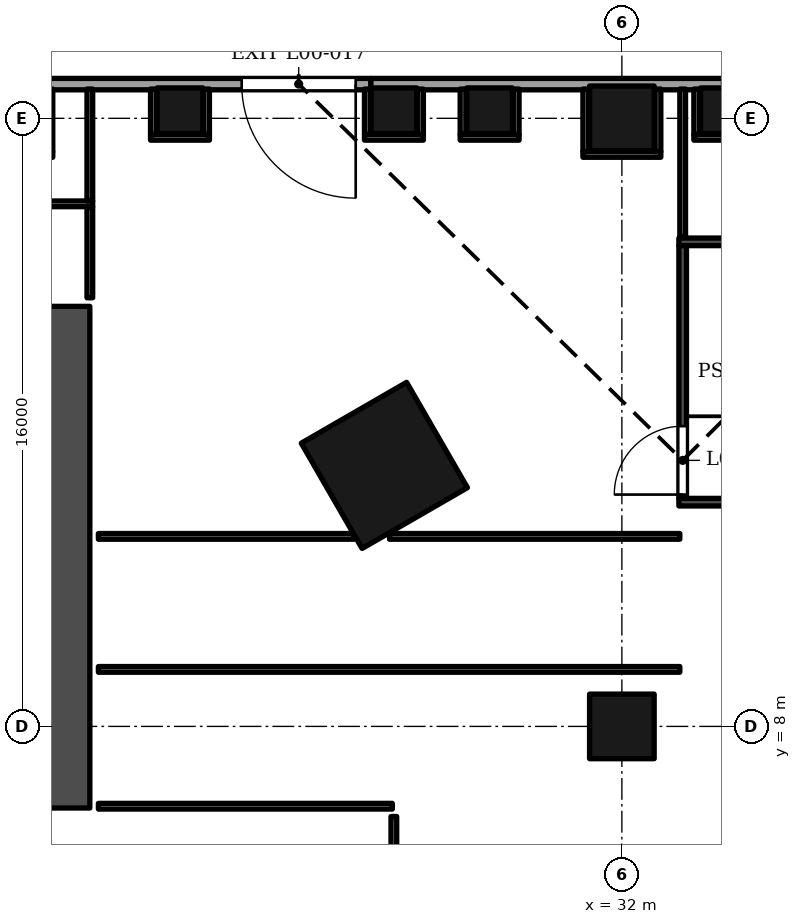
"""IFC4 building model, lengths in metres.
Left out: names, types, materials, properties, quantities, classifications, styles, units other than length and angle.
Written with IfcOpenShell. Run it as: python <this file> out.ifc"""

import sys

from ifc_helpers import new_model, si_unit, direction, frame, frame_2d, origin, origin_2d, place, context, subcontext, project, spatial, rectangle, extrude, element, fill, save


model = new_model("IFC4")
c1 = context("Model", 3, precision=1e-05, world=origin(), true_north=direction((0.0, 1.0)))
c2 = subcontext(c1, "Body", "Model", "MODEL_VIEW")
j1 = project(units=[si_unit("LENGTHUNIT", "METRE"), si_unit("PLANEANGLEUNIT", "RADIAN")], contexts=[c1])
p1 = place(None, origin())
s1 = spatial("IfcSite", under=j1, at=p1, CompositionType="ELEMENT")
p2 = place(p1, origin())
s2 = spatial("IfcBuilding", under=s1, at=p2, CompositionType="ELEMENT")
p3 = place(p2, origin())
s3 = spatial("IfcBuildingStorey", under=s2, at=p3, CompositionType="ELEMENT", Elevation=0.0)
for number, where, z_axis, x_axis in (
    (1, (32.0, 8.0, 0.0), (0.0, 0.0, 1.0), (1.0, 0.0, 0.0)),
    (2, (32.0, 24.0, 0.0), (0.0, 0.0, 1.0), (1.0, 0.0, 0.0)),
):
    element("IfcColumn", number, at=place(p3, frame(where, z_axis=z_axis, x_axis=x_axis)), inside=s3, PredefinedType="COLUMN", context=c2, shape_type="SweptSolid", body=[
        extrude(rectangle(XDim=1.7, YDim=1.7, at=origin_2d()), origin(), (0.0, 0.0, 1.0), 9.0),
    ])
for number, where, z_axis, x_axis in (
    (3, (34.669, 24.2, 0.0), (0.0, 0.0, 1.0), (1.0, 0.0, 0.0)),
    (4, (26.002, 24.2, 0.0), (0.0, 0.0, 1.0), (1.0, 0.0, 0.0)),
    (5, (20.372, 24.2, 0.0), (0.0, 0.0, 1.0), (1.0, 0.0, 0.0)),
    (6, (28.52, 24.2, 0.0), (0.0, 0.0, 1.0), (1.0, 0.0, 0.0)),
):
    element("IfcColumn", number, at=place(p3, frame(where, z_axis=z_axis, x_axis=x_axis)), inside=s3, PredefinedType="COLUMN", context=c2, shape_type="SweptSolid", body=[
        extrude(rectangle(XDim=1.2, YDim=1.2, at=origin_2d()), origin(), (0.0, 0.0, 1.0), 9.0),
    ])
p4 = place(p3, frame((25.75, 14.867, 0.0), z_axis=(0.0, 0.0, 1.0), x_axis=(-0.866025386331, -0.50000003023, 0.0)))
e7 = element("IfcColumn", 7, at=p4, inside=s3, PredefinedType="COLUMN", context=c2, shape_type="SweptSolid", body=[
    extrude(rectangle(XDim=3.2, YDim=3.2, at=origin_2d()), origin(), (0.0, 0.0, 1.0), 9.0),
])
p5 = place(p3, frame((17.45, 5.853, 0.0), z_axis=(0.0, 0.0, 1.0), x_axis=(0.0, 1.0, 0.0)))
e8 = element("IfcWall", 8, at=p5, inside=s3, PredefinedType="SHEAR", context=c2, shape_type="SweptSolid", body=[
    extrude(rectangle(XDim=13.2, YDim=1.1, at=frame_2d((6.6, 0.0))), origin(), (0.0, 0.0, 1.0), 9.0),
])
p6 = place(p5, frame((4.1, 0.0, 0.0)))
e9 = element("IfcOpeningElement", 9, at=p6, cuts=e8, PredefinedType="OPENING", context=c2, shape_type="SweptSolid", body=[
    extrude(rectangle(XDim=1.6, YDim=2.1, at=frame_2d((0.8, 1.05))), frame((0.0, 0.56, 0.0), z_axis=(0.0, -1.0, 0.0), x_axis=(1.0, 0.0, 0.0)), (0.0, 0.0, 1.0), 1.12),
])
p7 = place(p5, frame((10.15, 0.0, 0.0)))
e10 = element("IfcOpeningElement", 10, at=p7, cuts=e8, PredefinedType="OPENING", context=c2, shape_type="SweptSolid", body=[
    extrude(rectangle(XDim=0.9, YDim=2.1, at=frame_2d((0.45, 1.05))), frame((0.0, 0.56, 0.0), z_axis=(0.0, -1.0, 0.0), x_axis=(1.0, 0.0, 0.0)), (0.0, 0.0, 1.0), 1.12),
])
p8 = place(p3, frame((25.396, 24.9, 0.0), z_axis=(0.0, 0.0, 1.0), x_axis=(-1.0, 0.0, 0.0)))
e11 = element("IfcWall", 11, at=p8, inside=s3, PredefinedType="ELEMENTEDWALL", context=c2, shape_type="SweptSolid", body=[
    extrude(rectangle(XDim=25.15, YDim=0.3, at=frame_2d((12.575, 0.0))), origin(), (0.0, 0.0, 1.0), 7.6),
])
p9 = place(p8, frame((0.4, 0.0, 0.0)))
e12 = element("IfcOpeningElement", 12, at=p9, cuts=e11, PredefinedType="OPENING", context=c2, shape_type="SweptSolid", body=[
    extrude(rectangle(XDim=3.0, YDim=2.7, at=frame_2d((1.5, 1.35))), frame((0.0, 0.16, 0.0), z_axis=(0.0, -1.0, 0.0), x_axis=(1.0, 0.0, 0.0)), (0.0, 0.0, 1.0), 0.32),
])
p10 = place(p3, frame((34.673, 24.9, 0.0), z_axis=(0.0, 0.0, 1.0), x_axis=(-1.0, 0.0, 0.0)))
e13 = element("IfcWall", 13, at=p10, inside=s3, PredefinedType="SOLIDWALL", context=c2, shape_type="SweptSolid", body=[
    extrude(rectangle(XDim=9.277, YDim=0.3, at=frame_2d((4.639, 0.0))), origin(), (0.0, 0.0, 1.0), 7.6),
])
for number, where, z_axis, x_axis in (
    (14, (33.5, 13.9, 0.0), (0.0, 0.0, 1.0), (1.0, 0.0, 0.0)),
    (15, (33.5, 20.75, 0.0), (0.0, 0.0, 1.0), (1.0, 0.0, 0.0)),
):
    element("IfcWall", number, at=place(p3, frame(where, z_axis=z_axis, x_axis=x_axis)), inside=s3, PredefinedType="SOLIDWALL", context=c2, shape_type="SweptSolid", body=[
        extrude(rectangle(XDim=4.87, YDim=0.2, at=frame_2d((2.435, 0.0))), origin(), (0.0, 0.0, 1.0), 8.5),
    ])
p11 = place(p3, frame((33.6, 14.0, 0.0), z_axis=(0.0, 0.0, 1.0), x_axis=(0.0, 1.0, 0.0)))
e16 = element("IfcWall", 16, at=p11, inside=s3, PredefinedType="SOLIDWALL", context=c2, shape_type="SweptSolid", body=[
    extrude(rectangle(XDim=6.65, YDim=0.2, at=frame_2d((3.325, 0.0))), origin(), (0.0, 0.0, 1.0), 8.5),
])
p12 = place(p11, frame((0.1, 0.0, 0.0)))
e17 = element("IfcOpeningElement", 17, at=p12, cuts=e16, PredefinedType="OPENING", context=c2, shape_type="SweptSolid", body=[
    extrude(rectangle(XDim=1.8, YDim=2.4, at=frame_2d((0.9, 1.2))), frame((0.0, 0.11, 0.0), z_axis=(0.0, -1.0, 0.0), x_axis=(1.0, 0.0, 0.0)), (0.0, 0.0, 1.0), 0.22),
])
p13 = place(p3, frame((26.0, 0.075, 0.0), z_axis=(0.0, 0.0, 1.0), x_axis=(0.0, 1.0, 0.0)))
e18 = element("IfcWall", 18, at=p13, inside=s3, PredefinedType="PARTITIONING", context=c2, shape_type="SweptSolid", body=[
    extrude(rectangle(XDim=5.555, YDim=0.15, at=frame_2d((2.777, 0.0))), origin(), (0.0, 0.0, 1.0), 8.5),
])
p14 = place(p3, frame((18.225, 5.9, 0.0), z_axis=(0.0, 0.0, 1.0), x_axis=(1.0, 0.0, 0.0)))
e19 = element("IfcWall", 19, at=p14, inside=s3, PredefinedType="PARTITIONING", context=c2, shape_type="SweptSolid", body=[
    extrude(rectangle(XDim=7.735, YDim=0.15, at=frame_2d((3.867, 0.0))), origin(), (0.0, 0.0, 1.0), 7.6),
])
p15 = place(p3, frame((18.225, 9.5, 0.0), z_axis=(0.0, 0.0, 1.0), x_axis=(1.0, 0.0, 0.0)))
e20 = element("IfcWall", 20, at=p15, inside=s3, PredefinedType="PARTITIONING", context=c2, shape_type="SweptSolid", body=[
    extrude(rectangle(XDim=15.3, YDim=0.15, at=frame_2d((7.65, 0.0))), origin(), (0.0, 0.0, 1.0), 7.3),
])
p16 = place(p3, frame((18.225, 13.0, 0.0), z_axis=(0.0, 0.0, 1.0), x_axis=(1.0, 0.0, 0.0)))
e21 = element("IfcWall", 21, at=p16, inside=s3, PredefinedType="PARTITIONING", context=c2, shape_type="SweptSolid", body=[
    extrude(rectangle(XDim=6.732, YDim=0.15, at=frame_2d((3.366, 0.0))), origin(), (0.0, 0.0, 1.0), 7.6),
])
p17 = place(p16, frame((3.575, 0.0, 0.0)))
e22 = element("IfcOpeningElement", 22, at=p17, cuts=e21, PredefinedType="OPENING", context=c2, shape_type="SweptSolid", body=[
    extrude(rectangle(XDim=1.2, YDim=2.1, at=frame_2d((0.6, 1.05))), frame((0.0, 0.085, 0.0), z_axis=(0.0, -1.0, 0.0), x_axis=(1.0, 0.0, 0.0)), (0.0, 0.0, 1.0), 0.17),
])
p18 = place(p3, frame((25.886, 13.0, 0.0), z_axis=(0.0, 0.0, 1.0), x_axis=(1.0, 0.0, 0.0)))
e23 = element("IfcWall", 23, at=p18, inside=s3, PredefinedType="PARTITIONING", context=c2, shape_type="SweptSolid", body=[
    extrude(rectangle(XDim=7.639, YDim=0.15, at=frame_2d((3.819, 0.0))), origin(), (0.0, 0.0, 1.0), 7.3),
])
p19 = place(p3, frame((18.0, 19.278, 0.0), z_axis=(0.0, 0.0, 1.0), x_axis=(0.0, 1.0, 0.0)))
e24 = element("IfcWall", 24, at=p19, inside=s3, PredefinedType="PARTITIONING", context=c2, shape_type="SweptSolid", body=[
    extrude(rectangle(XDim=2.397, YDim=0.15, at=frame_2d((1.198, 0.0))), origin(), (0.0, 0.0, 1.0), 8.5),
])
p20 = place(p3, frame((33.6, 20.89, 0.0), z_axis=(0.0, 0.0, 1.0), x_axis=(0.0, 1.0, 0.0)))
e25 = element("IfcWall", 25, at=p20, inside=s3, PredefinedType="PARTITIONING", context=c2, shape_type="SweptSolid", body=[
    extrude(rectangle(XDim=3.88, YDim=0.15, at=frame_2d((1.94, 0.0))), origin(), (0.0, 0.0, 1.0), 7.6),
])
p21 = place(p20, frame((0.61, 0.0, 0.0)))
e26 = element("IfcOpeningElement", 26, at=p21, cuts=e25, PredefinedType="OPENING", context=c2, shape_type="SweptSolid", body=[
    extrude(rectangle(XDim=1.2, YDim=2.1, at=frame_2d((0.6, 1.05))), frame((0.0, 0.085, 0.0), z_axis=(0.0, -1.0, 0.0), x_axis=(1.0, 0.0, 0.0)), (0.0, 0.0, 1.0), 0.17),
])
p22 = place(p3, frame((-18.075, 21.75, 0.0), z_axis=(0.0, 0.0, 1.0), x_axis=(1.0, 0.0, 0.0)))
e27 = element("IfcWall", 27, at=p22, inside=s3, PredefinedType="PARTITIONING", context=c2, shape_type="SweptSolid", body=[
    extrude(rectangle(XDim=36.15, YDim=0.15, at=frame_2d((18.075, 0.0))), origin(), (0.0, 0.0, 1.0), 7.3),
])
p23 = place(p22, frame((2.675, 0.0, 0.0)))
e28 = element("IfcOpeningElement", 28, at=p23, cuts=e27, PredefinedType="OPENING", context=c2, shape_type="SweptSolid", body=[
    extrude(rectangle(XDim=0.9, YDim=2.1, at=frame_2d((0.45, 1.05))), frame((0.0, 0.085, 0.0), z_axis=(0.0, -1.0, 0.0), x_axis=(1.0, 0.0, 0.0)), (0.0, 0.0, 1.0), 0.17),
])
p24 = place(p22, frame((8.675, 0.0, 0.0)))
e29 = element("IfcOpeningElement", 29, at=p24, cuts=e27, PredefinedType="OPENING", context=c2, shape_type="SweptSolid", body=[
    extrude(rectangle(XDim=0.9, YDim=2.1, at=frame_2d((0.45, 1.05))), frame((0.0, 0.085, 0.0), z_axis=(0.0, -1.0, 0.0), x_axis=(1.0, 0.0, 0.0)), (0.0, 0.0, 1.0), 0.17),
])
p25 = place(p22, frame((14.675, 0.0, 0.0)))
e30 = element("IfcOpeningElement", 30, at=p25, cuts=e27, PredefinedType="OPENING", context=c2, shape_type="SweptSolid", body=[
    extrude(rectangle(XDim=0.9, YDim=2.1, at=frame_2d((0.45, 1.05))), frame((0.0, 0.085, 0.0), z_axis=(0.0, -1.0, 0.0), x_axis=(1.0, 0.0, 0.0)), (0.0, 0.0, 1.0), 0.17),
])
p26 = place(p22, frame((20.675, 0.0, 0.0)))
e31 = element("IfcOpeningElement", 31, at=p26, cuts=e27, PredefinedType="OPENING", context=c2, shape_type="SweptSolid", body=[
    extrude(rectangle(XDim=0.9, YDim=2.1, at=frame_2d((0.45, 1.05))), frame((0.0, 0.085, 0.0), z_axis=(0.0, -1.0, 0.0), x_axis=(1.0, 0.0, 0.0)), (0.0, 0.0, 1.0), 0.17),
])
p27 = place(p22, frame((26.675, 0.0, 0.0)))
e32 = element("IfcOpeningElement", 32, at=p27, cuts=e27, PredefinedType="OPENING", context=c2, shape_type="SweptSolid", body=[
    extrude(rectangle(XDim=0.9, YDim=2.1, at=frame_2d((0.45, 1.05))), frame((0.0, 0.085, 0.0), z_axis=(0.0, -1.0, 0.0), x_axis=(1.0, 0.0, 0.0)), (0.0, 0.0, 1.0), 0.17),
])
p28 = place(p22, frame((32.675, 0.0, 0.0)))
e33 = element("IfcOpeningElement", 33, at=p28, cuts=e27, PredefinedType="OPENING", context=c2, shape_type="SweptSolid", body=[
    extrude(rectangle(XDim=0.9, YDim=2.1, at=frame_2d((0.45, 1.05))), frame((0.0, 0.085, 0.0), z_axis=(0.0, -1.0, 0.0), x_axis=(1.0, 0.0, 0.0)), (0.0, 0.0, 1.0), 0.17),
])
p29 = place(p3, frame((18.0, 21.825, 0.0), z_axis=(0.0, 0.0, 1.0), x_axis=(0.0, 1.0, 0.0)))
e34 = element("IfcWall", 34, at=p29, inside=s3, PredefinedType="PARTITIONING", context=c2, shape_type="SweptSolid", body=[
    extrude(rectangle(XDim=2.945, YDim=0.15, at=frame_2d((1.473, 0.0))), origin(), (0.0, 0.0, 1.0), 7.3),
])
for number, where, z_axis, x_axis in (
    (35, (14.975, 23.05, 0.0), (0.0, 0.0, 1.0), (1.0, 0.0, 0.0)),
    (36, (30.975, 23.05, 0.0), (0.0, 0.0, 1.0), (1.0, 0.0, 0.0)),
):
    element("IfcWall", number, at=place(p3, frame(where, z_axis=z_axis, x_axis=x_axis)), inside=s3, PredefinedType="PARTITIONING", context=c2, shape_type="SweptSolid", body=[
        extrude(rectangle(XDim=2.05, YDim=0.15, at=frame_2d((1.025, 0.0))), origin(), (0.0, 0.0, 1.0), 7.3),
    ])
for number, where, z_axis, x_axis in (
    (37, (16.95, 23.125, 0.0), (0.0, 0.0, 1.0), (0.0, 1.0, 0.0)),
    (38, (31.05, 23.125, 0.0), (0.0, 0.0, 1.0), (0.0, 1.0, 0.0)),
):
    element("IfcWall", number, at=place(p3, frame(where, z_axis=z_axis, x_axis=x_axis)), inside=s3, PredefinedType="PARTITIONING", context=c2, shape_type="SweptSolid", body=[
        extrude(rectangle(XDim=1.645, YDim=0.15, at=frame_2d((0.823, 0.0))), origin(), (0.0, 0.0, 1.0), 7.3),
    ])
p30 = place(p3, frame((32.95, 23.125, 0.0), z_axis=(0.0, 0.0, 1.0), x_axis=(0.0, 1.0, 0.0)))
e39 = element("IfcWall", 39, at=p30, inside=s3, PredefinedType="PARTITIONING", context=c2, shape_type="SweptSolid", body=[
    extrude(rectangle(XDim=1.645, YDim=0.15, at=frame_2d((0.823, 0.0))), origin(), (0.0, 0.0, 1.0), 7.6),
])
for number, where, z_axis, x_axis in (
    (40, (19.597, 23.5, 0.0), (0.0, 0.0, 1.0), (1.0, 0.0, 0.0)),
    (41, (25.227, 23.5, 0.0), (0.0, 0.0, 1.0), (1.0, 0.0, 0.0)),
):
    element("IfcWall", number, at=place(p3, frame(where, z_axis=z_axis, x_axis=x_axis)), inside=s3, PredefinedType="PARTITIONING", context=c2, shape_type="SweptSolid", body=[
        extrude(rectangle(XDim=1.55, YDim=0.15, at=frame_2d((0.775, 0.0))), origin(), (0.0, 0.0, 1.0), 8.5),
    ])
p31 = place(p3, frame((27.745, 23.5, 0.0), z_axis=(0.0, 0.0, 1.0), x_axis=(1.0, 0.0, 0.0)))
e42 = element("IfcWall", 42, at=p31, inside=s3, PredefinedType="PARTITIONING", context=c2, shape_type="SweptSolid", body=[
    extrude(rectangle(XDim=1.55, YDim=0.15, at=frame_2d((0.775, 0.0))), origin(), (0.0, 0.0, 1.0), 8.5),
])
p32 = place(p3, frame((33.894, 23.5, 0.0), z_axis=(0.0, 0.0, 1.0), x_axis=(1.0, 0.0, 0.0)))
e43 = element("IfcWall", 43, at=p32, inside=s3, PredefinedType="PARTITIONING", context=c2, shape_type="SweptSolid", body=[
    extrude(rectangle(XDim=1.55, YDim=0.15, at=frame_2d((0.775, 0.0))), origin(), (0.0, 0.0, 1.0), 8.5),
])
for number, where, z_axis, x_axis in (
    (44, (19.672, 23.575, 0.0), (0.0, 0.0, 1.0), (0.0, 1.0, 0.0)),
    (45, (21.072, 23.575, 0.0), (0.0, 0.0, 1.0), (0.0, 1.0, 0.0)),
    (46, (25.302, 23.575, 0.0), (0.0, 0.0, 1.0), (0.0, 1.0, 0.0)),
):
    element("IfcWall", number, at=place(p3, frame(where, z_axis=z_axis, x_axis=x_axis)), inside=s3, PredefinedType="PARTITIONING", context=c2, shape_type="SweptSolid", body=[
        extrude(rectangle(XDim=1.195, YDim=0.15, at=frame_2d((0.598, 0.0))), origin(), (0.0, 0.0, 1.0), 7.3),
    ])
for number, where, z_axis, x_axis in (
    (47, (26.702, 23.575, 0.0), (0.0, 0.0, 1.0), (0.0, 1.0, 0.0)),
    (48, (27.82, 23.575, 0.0), (0.0, 0.0, 1.0), (0.0, 1.0, 0.0)),
):
    element("IfcWall", number, at=place(p3, frame(where, z_axis=z_axis, x_axis=x_axis)), inside=s3, PredefinedType="PARTITIONING", context=c2, shape_type="SweptSolid", body=[
        extrude(rectangle(XDim=1.195, YDim=0.15, at=frame_2d((0.598, 0.0))), origin(), (0.0, 0.0, 1.0), 7.6),
    ])
p33 = place(p3, frame((29.22, 23.575, 0.0), z_axis=(0.0, 0.0, 1.0), x_axis=(0.0, 1.0, 0.0)))
e49 = element("IfcWall", 49, at=p33, inside=s3, PredefinedType="PARTITIONING", context=c2, shape_type="SweptSolid", body=[
    extrude(rectangle(XDim=1.195, YDim=0.15, at=frame_2d((0.598, 0.0))), origin(), (0.0, 0.0, 1.0), 7.3),
])
p34 = place(p3, frame((33.969, 23.575, 0.0), z_axis=(0.0, 0.0, 1.0), x_axis=(0.0, 1.0, 0.0)))
e50 = element("IfcWall", 50, at=p34, inside=s3, PredefinedType="PARTITIONING", context=c2, shape_type="SweptSolid", body=[
    extrude(rectangle(XDim=1.195, YDim=0.15, at=frame_2d((0.598, 0.0))), origin(), (0.0, 0.0, 1.0), 7.6),
])
p35 = place(p9, origin())
e51 = element("IfcDoor", 51, at=p35, inside=s3, OperationType="DOUBLE_DOOR_SINGLE_SWING", PredefinedType="DOOR", context=c2, shape_type="SweptSolid", body=[
    extrude(rectangle(XDim=3.0, YDim=2.7, at=frame_2d((1.5, 1.35))), frame((0.0, 0.025, 0.0), z_axis=(0.0, -1.0, 0.0), x_axis=(1.0, 0.0, 0.0)), (0.0, 0.0, 1.0), 0.05),
])
fill(e12, e51)
p36 = place(p6, origin())
e52 = element("IfcDoor", 52, at=p36, inside=s3, OperationType="DOUBLE_DOOR_SINGLE_SWING", PredefinedType="DOOR", context=c2, shape_type="SweptSolid", body=[
    extrude(rectangle(XDim=1.6, YDim=2.1, at=frame_2d((0.8, 1.05))), frame((0.0, 0.275, 0.0), z_axis=(0.0, -1.0, 0.0), x_axis=(1.0, 0.0, 0.0)), (0.0, 0.0, 1.0), 0.05),
])
fill(e9, e52)
p37 = place(p7, origin())
e53 = element("IfcDoor", 53, at=p37, inside=s3, OperationType="SINGLE_SWING_LEFT", PredefinedType="DOOR", context=c2, shape_type="SweptSolid", body=[
    extrude(rectangle(XDim=0.9, YDim=2.1, at=frame_2d((0.45, 1.05))), frame((0.0, 0.275, 0.0), z_axis=(0.0, -1.0, 0.0), x_axis=(1.0, 0.0, 0.0)), (0.0, 0.0, 1.0), 0.05),
])
fill(e10, e53)
p38 = place(p12, origin())
e54 = element("IfcDoor", 54, at=p38, inside=s3, OperationType="DOUBLE_DOOR_SINGLE_SWING", PredefinedType="DOOR", context=c2, shape_type="SweptSolid", body=[
    extrude(rectangle(XDim=1.8, YDim=2.4, at=frame_2d((0.9, 1.2))), frame((0.0, 0.025, 0.0), z_axis=(0.0, -1.0, 0.0), x_axis=(1.0, 0.0, 0.0)), (0.0, 0.0, 1.0), 0.05),
])
fill(e17, e54)
p39 = place(p17, origin())
e55 = element("IfcDoor", 55, at=p39, inside=s3, OperationType="SINGLE_SWING_LEFT", PredefinedType="DOOR", context=c2, shape_type="SweptSolid", body=[
    extrude(rectangle(XDim=1.2, YDim=2.1, at=frame_2d((0.6, 1.05))), frame((0.0, 0.025, 0.0), z_axis=(0.0, -1.0, 0.0), x_axis=(1.0, 0.0, 0.0)), (0.0, 0.0, 1.0), 0.05),
])
fill(e22, e55)
p40 = place(p21, origin())
e56 = element("IfcDoor", 56, at=p40, inside=s3, OperationType="SINGLE_SWING_LEFT", PredefinedType="DOOR", context=c2, shape_type="SweptSolid", body=[
    extrude(rectangle(XDim=1.2, YDim=2.1, at=frame_2d((0.6, 1.05))), frame((0.0, 0.025, 0.0), z_axis=(0.0, -1.0, 0.0), x_axis=(1.0, 0.0, 0.0)), (0.0, 0.0, 1.0), 0.05),
])
fill(e26, e56)
save(model, sys.argv[1])
